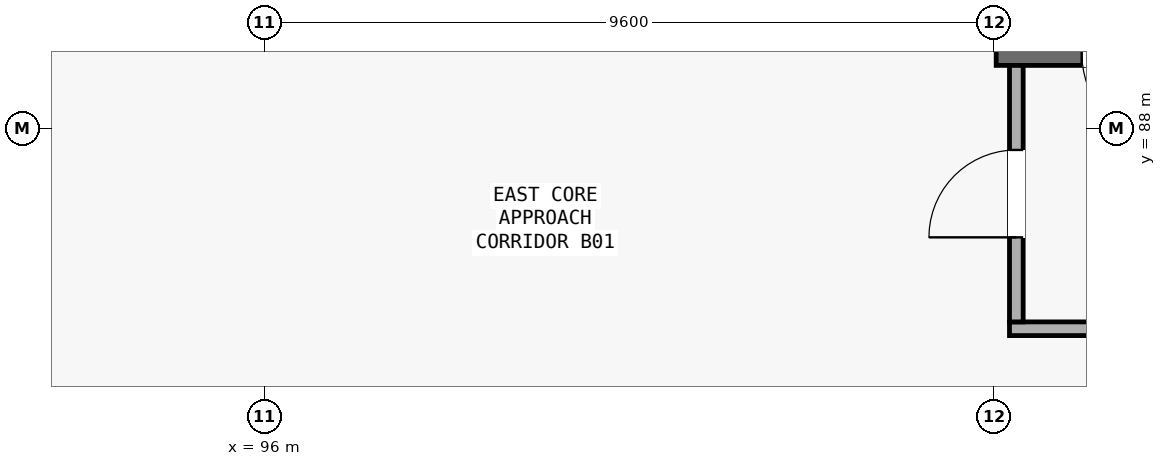
"""IFC4 building model, lengths in metres.
Left out: names, types, materials, properties, quantities, classifications, styles, units other than length and angle.
Written with IfcOpenShell. Run it as: python <this file> out.ifc"""

import sys

from ifc_helpers import new_model, si_unit, direction, frame, frame_2d, origin, place, context, subcontext, project, spatial, rectangle, extrude, element, fill, save


model = new_model("IFC4")
c1 = context("Model", 3, precision=1e-05, world=origin(), true_north=direction((0.0, 1.0)))
c2 = subcontext(c1, "Body", "Model", "MODEL_VIEW")
j1 = project(units=[si_unit("LENGTHUNIT", "METRE"), si_unit("PLANEANGLEUNIT", "RADIAN")], contexts=[c1])
p1 = place(None, origin())
s1 = spatial("IfcSite", under=j1, at=p1, CompositionType="ELEMENT")
p2 = place(p1, origin())
s2 = spatial("IfcBuilding", under=s1, at=p2, CompositionType="ELEMENT")
p3 = place(p2, frame((0.0, 0.0, -4.55)))
s3 = spatial("IfcBuildingStorey", under=s2, at=p3, CompositionType="ELEMENT", Elevation=-4.55)
p4 = place(p3, frame((105.625, 89.0, 0.0), z_axis=(0.0, 0.0, 1.0), x_axis=(1.0, 0.0, 0.0)))
e1 = element("IfcWall", 1, at=p4, inside=s3, PredefinedType="SHEAR", context=c2, shape_type="SweptSolid", body=[
    extrude(rectangle(XDim=3.9, YDim=0.35, at=frame_2d((1.95, 0.0))), origin(), (0.0, 0.0, 1.0), 4.28),
])
p5 = place(p4, frame((1.125, 0.0, 0.0)))
e2 = element("IfcOpeningElement", 2, at=p5, cuts=e1, PredefinedType="OPENING", context=c2, shape_type="SweptSolid", body=[
    extrude(rectangle(XDim=1.3, YDim=2.15, at=frame_2d((0.65, 1.075))), frame((0.0, 0.185, 0.0), z_axis=(0.0, -1.0, 0.0), x_axis=(1.0, 0.0, 0.0)), (0.0, 0.0, 1.0), 0.37),
])
p6 = place(p3, frame((105.8, 85.36, 0.0), z_axis=(0.0, 0.0, 1.0), x_axis=(1.0, 0.0, 0.0)))
e3 = element("IfcWall", 3, at=p6, inside=s3, PredefinedType="PARTITIONING", context=c2, shape_type="SweptSolid", body=[
    extrude(rectangle(XDim=8.55, YDim=0.18, at=frame_2d((4.275, 0.0))), origin(), (0.0, 0.0, 1.0), 4.28),
])
p7 = place(p3, frame((105.89, 85.45, 0.0), z_axis=(0.0, 0.0, 1.0), x_axis=(0.0, 1.0, 0.0)))
e4 = element("IfcWall", 4, at=p7, inside=s3, PredefinedType="PARTITIONING", context=c2, shape_type="SweptSolid", body=[
    extrude(rectangle(XDim=3.375, YDim=0.18, at=frame_2d((1.688, 0.0))), origin(), (0.0, 0.0, 1.0), 4.28),
])
p8 = place(p7, frame((1.113, 0.0, 0.0)))
e5 = element("IfcOpeningElement", 5, at=p8, cuts=e4, PredefinedType="OPENING", context=c2, shape_type="SweptSolid", body=[
    extrude(rectangle(XDim=1.15, YDim=2.15, at=frame_2d((0.575, 1.075))), frame((0.0, 0.1, 0.0), z_axis=(0.0, -1.0, 0.0), x_axis=(1.0, 0.0, 0.0)), (0.0, 0.0, 1.0), 0.2),
])
p9 = place(p5, frame((1.3, 0.0, 0.0), z_axis=(0.0, 0.0, 1.0), x_axis=(-1.0, 0.0, 0.0)))
e6 = element("IfcDoor", 6, at=p9, inside=s3, OperationType="SINGLE_SWING_RIGHT", PredefinedType="DOOR", context=c2, shape_type="SweptSolid", body=[
    extrude(rectangle(XDim=1.3, YDim=2.15, at=frame_2d((0.65, 1.075))), frame((0.0, 0.025, 0.0), z_axis=(0.0, -1.0, 0.0), x_axis=(1.0, 0.0, 0.0)), (0.0, 0.0, 1.0), 0.05),
])
fill(e2, e6)
p10 = place(p8, origin())
e7 = element("IfcDoor", 7, at=p10, inside=s3, OperationType="SINGLE_SWING_LEFT", PredefinedType="DOOR", context=c2, shape_type="SweptSolid", body=[
    extrude(rectangle(XDim=1.15, YDim=2.15, at=frame_2d((0.575, 1.075))), frame((0.0, 0.025, 0.0), z_axis=(0.0, -1.0, 0.0), x_axis=(1.0, 0.0, 0.0)), (0.0, 0.0, 1.0), 0.05),
])
fill(e5, e7)
save(model, sys.argv[1])
